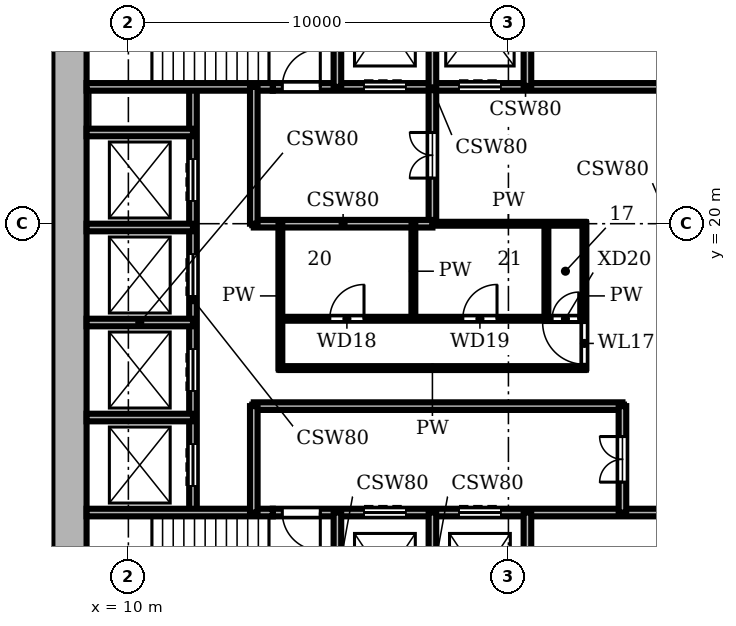
"""IFC4 building model, lengths in metres.
Left out: names, types, materials, properties, quantities, classifications, styles, units other than length and angle.
Written with IfcOpenShell. Run it as: python <this file> out.ifc"""

import sys

from ifc_helpers import new_model, si_unit, direction, frame, frame_2d, origin, place, context, subcontext, project, spatial, rectangle, extrude, element, fill, save


model = new_model("IFC4")
c1 = context("Model", 3, precision=1e-05, world=origin(), true_north=direction((0.0, 1.0)))
c2 = subcontext(c1, "Body", "Model", "MODEL_VIEW")
j1 = project(units=[si_unit("LENGTHUNIT", "METRE"), si_unit("PLANEANGLEUNIT", "RADIAN")], contexts=[c1])
p1 = place(None, origin())
s1 = spatial("IfcSite", under=j1, at=p1, CompositionType="ELEMENT")
p2 = place(p1, origin())
s2 = spatial("IfcBuilding", under=s1, at=p2, CompositionType="ELEMENT")
p3 = place(p2, frame((0.0, 0.0, 58.8)))
s3 = spatial("IfcBuildingStorey", under=s2, at=p3, CompositionType="ELEMENT", Elevation=58.8)
p4 = place(p3, frame((8.45, 27.1, 0.0), z_axis=(0.0, 0.0, 1.0), x_axis=(0.0, -1.0, 0.0)))
e1 = element("IfcWall", 1, at=p4, inside=s3, PredefinedType="SHEAR", context=c2, shape_type="SweptSolid", body=[
    extrude(rectangle(XDim=18.2, YDim=0.9, at=frame_2d((9.1, 0.0))), origin(), (0.0, 0.0, 1.0), 3.9),
])
p5 = place(p3, frame((8.9, 12.4, 0.0), z_axis=(0.0, 0.0, 1.0), x_axis=(1.0, 0.0, 0.0)))
e2 = element("IfcWall", 2, at=p5, inside=s3, PredefinedType="SHEAR", context=c2, shape_type="SweptSolid", body=[
    extrude(rectangle(XDim=4.9, YDim=0.2, at=frame_2d((2.45, 0.0))), origin(), (0.0, 0.0, 1.0), 3.58),
])
p6 = place(p3, frame((13.8, 12.4, 0.0), z_axis=(0.0, 0.0, 1.0), x_axis=(1.0, 0.0, 0.0)))
e3 = element("IfcWall", 3, at=p6, inside=s3, PredefinedType="SHEAR", context=c2, shape_type="SweptSolid", body=[
    extrude(rectangle(XDim=13.3, YDim=0.2, at=frame_2d((6.65, 0.0))), origin(), (0.0, 0.0, 1.0), 3.58),
])
p7 = place(p6, frame((2.4, 0.0, 0.0)))
e4 = element("IfcOpeningElement", 4, at=p7, cuts=e3, PredefinedType="OPENING", context=c2, shape_type="SweptSolid", body=[
    extrude(rectangle(XDim=1.1, YDim=2.1, at=frame_2d((0.55, 1.05))), frame((0.0, 0.11, 0.0), z_axis=(0.0, -1.0, 0.0), x_axis=(1.0, 0.0, 0.0)), (0.0, 0.0, 1.0), 0.22),
])
p8 = place(p6, frame((4.9, 0.0, 0.0)))
e5 = element("IfcOpeningElement", 5, at=p8, cuts=e3, PredefinedType="OPENING", context=c2, shape_type="SweptSolid", body=[
    extrude(rectangle(XDim=1.1, YDim=2.1, at=frame_2d((0.55, 1.05))), frame((0.0, 0.11, 0.0), z_axis=(0.0, -1.0, 0.0), x_axis=(1.0, 0.0, 0.0)), (0.0, 0.0, 1.0), 0.22),
])
p9 = place(p6, frame((0.25, 0.0, 0.0)))
e6 = element("IfcOpeningElement", 6, at=p9, cuts=e3, PredefinedType="OPENING", context=c2, shape_type="SweptSolid", body=[
    extrude(rectangle(XDim=1.0, YDim=2.1, at=frame_2d((0.5, 1.05))), frame((0.0, 0.11, 0.0), z_axis=(0.0, -1.0, 0.0), x_axis=(1.0, 0.0, 0.0)), (0.0, 0.0, 1.0), 0.22),
])
p10 = place(p3, frame((8.9, 14.9, 0.0), z_axis=(0.0, 0.0, 1.0), x_axis=(1.0, 0.0, 0.0)))
e7 = element("IfcWall", 7, at=p10, inside=s3, PredefinedType="SHEAR", context=c2, shape_type="SweptSolid", body=[
    extrude(rectangle(XDim=2.8, YDim=0.2, at=frame_2d((1.4, 0.0))), origin(), (0.0, 0.0, 1.0), 3.58),
])
p11 = place(p3, frame((13.3, 15.2, 0.0), z_axis=(0.0, 0.0, 1.0), x_axis=(1.0, 0.0, 0.0)))
e8 = element("IfcWall", 8, at=p11, inside=s3, PredefinedType="SHEAR", context=c2, shape_type="SweptSolid", body=[
    extrude(rectangle(XDim=9.7, YDim=0.2, at=frame_2d((4.85, 0.0))), origin(), (0.0, 0.0, 1.0), 3.58),
])
p12 = place(p3, frame((14.0, 16.2, 0.0), z_axis=(0.0, 0.0, 1.0), x_axis=(1.0, 0.0, 0.0)))
e9 = element("IfcWall", 9, at=p12, inside=s3, PredefinedType="PARTITIONING", context=c2, shape_type="SweptSolid", body=[
    extrude(rectangle(XDim=8.0, YDim=0.1, at=frame_2d((4.0, 0.0))), origin(), (0.0, 0.0, 1.0), 3.58),
])
p13 = place(p3, frame((8.9, 17.4, 0.0), z_axis=(0.0, 0.0, 1.0), x_axis=(1.0, 0.0, 0.0)))
e10 = element("IfcWall", 10, at=p13, inside=s3, PredefinedType="SHEAR", context=c2, shape_type="SweptSolid", body=[
    extrude(rectangle(XDim=2.8, YDim=0.2, at=frame_2d((1.4, 0.0))), origin(), (0.0, 0.0, 1.0), 3.58),
])
p14 = place(p3, frame((14.0, 17.5, 0.0), z_axis=(0.0, 0.0, 1.0), x_axis=(1.0, 0.0, 0.0)))
e11 = element("IfcWall", 11, at=p14, inside=s3, PredefinedType="PARTITIONING", context=c2, shape_type="SweptSolid", body=[
    extrude(rectangle(XDim=8.0, YDim=0.1, at=frame_2d((4.0, 0.0))), origin(), (0.0, 0.0, 1.0), 3.58),
])
p15 = place(p14, frame((1.3, 0.0, 0.0)))
e12 = element("IfcOpeningElement", 12, at=p15, cuts=e11, PredefinedType="OPENING", context=c2, shape_type="SweptSolid", body=[
    extrude(rectangle(XDim=0.9, YDim=2.1, at=frame_2d((0.45, 1.05))), frame((0.0, 0.06, 0.0), z_axis=(0.0, -1.0, 0.0), x_axis=(1.0, 0.0, 0.0)), (0.0, 0.0, 1.0), 0.12),
])
p16 = place(p14, frame((4.8, 0.0, 0.0)))
e13 = element("IfcOpeningElement", 13, at=p16, cuts=e11, PredefinedType="OPENING", context=c2, shape_type="SweptSolid", body=[
    extrude(rectangle(XDim=0.9, YDim=2.1, at=frame_2d((0.45, 1.05))), frame((0.0, 0.06, 0.0), z_axis=(0.0, -1.0, 0.0), x_axis=(1.0, 0.0, 0.0)), (0.0, 0.0, 1.0), 0.12),
])
p17 = place(p14, frame((7.15, 0.0, 0.0)))
e14 = element("IfcOpeningElement", 14, at=p17, cuts=e11, PredefinedType="OPENING", context=c2, shape_type="SweptSolid", body=[
    extrude(rectangle(XDim=0.7, YDim=2.1, at=frame_2d((0.35, 1.05))), frame((0.0, 0.06, 0.0), z_axis=(0.0, -1.0, 0.0), x_axis=(1.0, 0.0, 0.0)), (0.0, 0.0, 1.0), 0.12),
])
p18 = place(p3, frame((8.9, 19.9, 0.0), z_axis=(0.0, 0.0, 1.0), x_axis=(1.0, 0.0, 0.0)))
e15 = element("IfcWall", 15, at=p18, inside=s3, PredefinedType="SHEAR", context=c2, shape_type="SweptSolid", body=[
    extrude(rectangle(XDim=2.8, YDim=0.2, at=frame_2d((1.4, 0.0))), origin(), (0.0, 0.0, 1.0), 3.58),
])
p19 = place(p3, frame((18.0, 20.0, 0.0), z_axis=(0.0, 0.0, 1.0), x_axis=(1.0, 0.0, 0.0)))
e16 = element("IfcWall", 16, at=p19, inside=s3, PredefinedType="PARTITIONING", context=c2, shape_type="SweptSolid", body=[
    extrude(rectangle(XDim=4.0, YDim=0.1, at=frame_2d((2.0, 0.0))), origin(), (0.0, 0.0, 1.0), 3.58),
])
p20 = place(p3, frame((13.3, 20.0, 0.0), z_axis=(0.0, 0.0, 1.0), x_axis=(1.0, 0.0, 0.0)))
e17 = element("IfcWall", 17, at=p20, inside=s3, PredefinedType="SHEAR", context=c2, shape_type="SweptSolid", body=[
    extrude(rectangle(XDim=4.7, YDim=0.2, at=frame_2d((2.35, 0.0))), origin(), (0.0, 0.0, 1.0), 3.58),
])
p21 = place(p3, frame((8.9, 22.4, 0.0), z_axis=(0.0, 0.0, 1.0), x_axis=(1.0, 0.0, 0.0)))
e18 = element("IfcWall", 18, at=p21, inside=s3, PredefinedType="SHEAR", context=c2, shape_type="SweptSolid", body=[
    extrude(rectangle(XDim=2.8, YDim=0.2, at=frame_2d((1.4, 0.0))), origin(), (0.0, 0.0, 1.0), 3.58),
])
p22 = place(p3, frame((8.9, 23.6, 0.0), z_axis=(0.0, 0.0, 1.0), x_axis=(1.0, 0.0, 0.0)))
e19 = element("IfcWall", 19, at=p22, inside=s3, PredefinedType="SHEAR", context=c2, shape_type="SweptSolid", body=[
    extrude(rectangle(XDim=4.9, YDim=0.2, at=frame_2d((2.45, 0.0))), origin(), (0.0, 0.0, 1.0), 3.58),
])
p23 = place(p3, frame((13.8, 23.6, 0.0), z_axis=(0.0, 0.0, 1.0), x_axis=(1.0, 0.0, 0.0)))
e20 = element("IfcWall", 20, at=p23, inside=s3, PredefinedType="SHEAR", context=c2, shape_type="SweptSolid", body=[
    extrude(rectangle(XDim=13.3, YDim=0.2, at=frame_2d((6.65, 0.0))), origin(), (0.0, 0.0, 1.0), 3.58),
])
p24 = place(p23, frame((2.4, 0.0, 0.0)))
e21 = element("IfcOpeningElement", 21, at=p24, cuts=e20, PredefinedType="OPENING", context=c2, shape_type="SweptSolid", body=[
    extrude(rectangle(XDim=1.1, YDim=2.1, at=frame_2d((0.55, 1.05))), frame((0.0, 0.11, 0.0), z_axis=(0.0, -1.0, 0.0), x_axis=(1.0, 0.0, 0.0)), (0.0, 0.0, 1.0), 0.22),
])
p25 = place(p23, frame((4.9, 0.0, 0.0)))
e22 = element("IfcOpeningElement", 22, at=p25, cuts=e20, PredefinedType="OPENING", context=c2, shape_type="SweptSolid", body=[
    extrude(rectangle(XDim=1.1, YDim=2.1, at=frame_2d((0.55, 1.05))), frame((0.0, 0.11, 0.0), z_axis=(0.0, -1.0, 0.0), x_axis=(1.0, 0.0, 0.0)), (0.0, 0.0, 1.0), 0.22),
])
p26 = place(p23, frame((0.25, 0.0, 0.0)))
e23 = element("IfcOpeningElement", 23, at=p26, cuts=e20, PredefinedType="OPENING", context=c2, shape_type="SweptSolid", body=[
    extrude(rectangle(XDim=1.0, YDim=2.1, at=frame_2d((0.5, 1.05))), frame((0.0, 0.11, 0.0), z_axis=(0.0, -1.0, 0.0), x_axis=(1.0, 0.0, 0.0)), (0.0, 0.0, 1.0), 0.22),
])
p27 = place(p3, frame((11.7, 12.4, 0.0), z_axis=(0.0, 0.0, 1.0), x_axis=(0.0, 1.0, 0.0)))
e24 = element("IfcWall", 24, at=p27, inside=s3, PredefinedType="SHEAR", context=c2, shape_type="SweptSolid", body=[
    extrude(rectangle(XDim=11.2, YDim=0.2, at=frame_2d((5.6, 0.0))), origin(), (0.0, 0.0, 1.0), 3.58),
])
p28 = place(p27, frame((0.7, 0.0, 0.0)))
e25 = element("IfcOpeningElement", 25, at=p28, cuts=e24, PredefinedType="OPENING", context=c2, shape_type="SweptSolid", body=[
    extrude(rectangle(XDim=1.1, YDim=2.1, at=frame_2d((0.55, 1.05))), frame((0.0, 0.11, 0.0), z_axis=(0.0, -1.0, 0.0), x_axis=(1.0, 0.0, 0.0)), (0.0, 0.0, 1.0), 0.22),
])
p29 = place(p27, frame((3.2, 0.0, 0.0)))
e26 = element("IfcOpeningElement", 26, at=p29, cuts=e24, PredefinedType="OPENING", context=c2, shape_type="SweptSolid", body=[
    extrude(rectangle(XDim=1.1, YDim=2.1, at=frame_2d((0.55, 1.05))), frame((0.0, 0.11, 0.0), z_axis=(0.0, -1.0, 0.0), x_axis=(1.0, 0.0, 0.0)), (0.0, 0.0, 1.0), 0.22),
])
p30 = place(p27, frame((5.7, 0.0, 0.0)))
e27 = element("IfcOpeningElement", 27, at=p30, cuts=e24, PredefinedType="OPENING", context=c2, shape_type="SweptSolid", body=[
    extrude(rectangle(XDim=1.1, YDim=2.1, at=frame_2d((0.55, 1.05))), frame((0.0, 0.11, 0.0), z_axis=(0.0, -1.0, 0.0), x_axis=(1.0, 0.0, 0.0)), (0.0, 0.0, 1.0), 0.22),
])
p31 = place(p27, frame((8.2, 0.0, 0.0)))
e28 = element("IfcOpeningElement", 28, at=p31, cuts=e24, PredefinedType="OPENING", context=c2, shape_type="SweptSolid", body=[
    extrude(rectangle(XDim=1.1, YDim=2.1, at=frame_2d((0.55, 1.05))), frame((0.0, 0.11, 0.0), z_axis=(0.0, -1.0, 0.0), x_axis=(1.0, 0.0, 0.0)), (0.0, 0.0, 1.0), 0.22),
])
p32 = place(p3, frame((13.3, 12.4, 0.0), z_axis=(0.0, 0.0, 1.0), x_axis=(0.0, 1.0, 0.0)))
e29 = element("IfcWall", 29, at=p32, inside=s3, PredefinedType="SHEAR", context=c2, shape_type="SweptSolid", body=[
    extrude(rectangle(XDim=2.8, YDim=0.2, at=frame_2d((1.4, 0.0))), origin(), (0.0, 0.0, 1.0), 3.58),
])
p33 = place(p3, frame((13.3, 20.0, 0.0), z_axis=(0.0, 0.0, 1.0), x_axis=(0.0, 1.0, 0.0)))
e30 = element("IfcWall", 30, at=p33, inside=s3, PredefinedType="SHEAR", context=c2, shape_type="SweptSolid", body=[
    extrude(rectangle(XDim=3.6, YDim=0.2, at=frame_2d((1.8, 0.0))), origin(), (0.0, 0.0, 1.0), 3.58),
])
p34 = place(p3, frame((14.0, 16.2, 0.0), z_axis=(0.0, 0.0, 1.0), x_axis=(0.0, 1.0, 0.0)))
e31 = element("IfcWall", 31, at=p34, inside=s3, PredefinedType="PARTITIONING", context=c2, shape_type="SweptSolid", body=[
    extrude(rectangle(XDim=3.8, YDim=0.1, at=frame_2d((1.9, 0.0))), origin(), (0.0, 0.0, 1.0), 3.58),
])
for number, where, z_axis, x_axis in (
    (32, (15.5, 8.9, 0.0), (0.0, 0.0, 1.0), (0.0, 1.0, 0.0)),
    (33, (15.5, 23.6, 0.0), (0.0, 0.0, 1.0), (0.0, 1.0, 0.0)),
):
    element("IfcWall", number, at=place(p3, frame(where, z_axis=z_axis, x_axis=x_axis)), inside=s3, PredefinedType="SHEAR", context=c2, shape_type="SweptSolid", body=[
        extrude(rectangle(XDim=3.5, YDim=0.2, at=frame_2d((1.75, 0.0))), origin(), (0.0, 0.0, 1.0), 3.58),
    ])
p35 = place(p3, frame((17.5, 17.5, 0.0), z_axis=(0.0, 0.0, 1.0), x_axis=(0.0, 1.0, 0.0)))
e34 = element("IfcWall", 34, at=p35, inside=s3, PredefinedType="PARTITIONING", context=c2, shape_type="SweptSolid", body=[
    extrude(rectangle(XDim=2.5, YDim=0.1, at=frame_2d((1.25, 0.0))), origin(), (0.0, 0.0, 1.0), 3.58),
])
p36 = place(p3, frame((18.0, 8.9, 0.0), z_axis=(0.0, 0.0, 1.0), x_axis=(0.0, 1.0, 0.0)))
e35 = element("IfcWall", 35, at=p36, inside=s3, PredefinedType="SHEAR", context=c2, shape_type="SweptSolid", body=[
    extrude(rectangle(XDim=3.5, YDim=0.2, at=frame_2d((1.75, 0.0))), origin(), (0.0, 0.0, 1.0), 3.58),
])
p37 = place(p3, frame((18.0, 20.0, 0.0), z_axis=(0.0, 0.0, 1.0), x_axis=(0.0, 1.0, 0.0)))
e36 = element("IfcWall", 36, at=p37, inside=s3, PredefinedType="SHEAR", context=c2, shape_type="SweptSolid", body=[
    extrude(rectangle(XDim=7.1, YDim=0.2, at=frame_2d((3.55, 0.0))), origin(), (0.0, 0.0, 1.0), 3.58),
])
p38 = place(p37, frame((1.2, 0.0, 0.0)))
e37 = element("IfcOpeningElement", 37, at=p38, cuts=e36, PredefinedType="OPENING", context=c2, shape_type="SweptSolid", body=[
    extrude(rectangle(XDim=1.2, YDim=2.1, at=frame_2d((0.6, 1.05))), frame((0.0, 0.11, 0.0), z_axis=(0.0, -1.0, 0.0), x_axis=(1.0, 0.0, 0.0)), (0.0, 0.0, 1.0), 0.22),
])
for number, where, z_axis, x_axis in (
    (38, (20.5, 8.9, 0.0), (0.0, 0.0, 1.0), (0.0, 1.0, 0.0)),
    (39, (20.5, 23.6, 0.0), (0.0, 0.0, 1.0), (0.0, 1.0, 0.0)),
):
    element("IfcWall", number, at=place(p3, frame(where, z_axis=z_axis, x_axis=x_axis)), inside=s3, PredefinedType="SHEAR", context=c2, shape_type="SweptSolid", body=[
        extrude(rectangle(XDim=3.5, YDim=0.2, at=frame_2d((1.75, 0.0))), origin(), (0.0, 0.0, 1.0), 3.58),
    ])
p39 = place(p3, frame((21.0, 17.5, 0.0), z_axis=(0.0, 0.0, 1.0), x_axis=(0.0, 1.0, 0.0)))
e40 = element("IfcWall", 40, at=p39, inside=s3, PredefinedType="PARTITIONING", context=c2, shape_type="SweptSolid", body=[
    extrude(rectangle(XDim=2.5, YDim=0.1, at=frame_2d((1.25, 0.0))), origin(), (0.0, 0.0, 1.0), 3.58),
])
p40 = place(p3, frame((22.0, 16.2, 0.0), z_axis=(0.0, 0.0, 1.0), x_axis=(0.0, 1.0, 0.0)))
e41 = element("IfcWall", 41, at=p40, inside=s3, PredefinedType="PARTITIONING", context=c2, shape_type="SweptSolid", body=[
    extrude(rectangle(XDim=3.8, YDim=0.1, at=frame_2d((1.9, 0.0))), origin(), (0.0, 0.0, 1.0), 3.58),
])
p41 = place(p40, frame((0.1, 0.0, 0.0)))
e42 = element("IfcOpeningElement", 42, at=p41, cuts=e41, PredefinedType="OPENING", context=c2, shape_type="SweptSolid", body=[
    extrude(rectangle(XDim=1.1, YDim=2.1, at=frame_2d((0.55, 1.05))), frame((0.0, 0.06, 0.0), z_axis=(0.0, -1.0, 0.0), x_axis=(1.0, 0.0, 0.0)), (0.0, 0.0, 1.0), 0.12),
])
p42 = place(p3, frame((23.0, 12.4, 0.0), z_axis=(0.0, 0.0, 1.0), x_axis=(0.0, 1.0, 0.0)))
e43 = element("IfcWall", 43, at=p42, inside=s3, PredefinedType="SHEAR", context=c2, shape_type="SweptSolid", body=[
    extrude(rectangle(XDim=2.8, YDim=0.2, at=frame_2d((1.4, 0.0))), origin(), (0.0, 0.0, 1.0), 3.58),
])
p43 = place(p42, frame((0.8, 0.0, 0.0)))
e44 = element("IfcOpeningElement", 44, at=p43, cuts=e43, PredefinedType="OPENING", context=c2, shape_type="SweptSolid", body=[
    extrude(rectangle(XDim=1.2, YDim=2.1, at=frame_2d((0.6, 1.05))), frame((0.0, 0.11, 0.0), z_axis=(0.0, -1.0, 0.0), x_axis=(1.0, 0.0, 0.0)), (0.0, 0.0, 1.0), 0.22),
])
p44 = place(p28, origin())
e45 = element("IfcDoor", 45, at=p44, inside=s3, OperationType="DOUBLE_DOOR_SLIDING", PredefinedType="DOOR", context=c2, shape_type="SweptSolid", body=[
    extrude(rectangle(XDim=1.1, YDim=2.1, at=frame_2d((0.55, 1.05))), frame((0.0, 0.025, 0.0), z_axis=(0.0, -1.0, 0.0), x_axis=(1.0, 0.0, 0.0)), (0.0, 0.0, 1.0), 0.05),
])
fill(e25, e45)
p45 = place(p29, origin())
e46 = element("IfcDoor", 46, at=p45, inside=s3, OperationType="DOUBLE_DOOR_SLIDING", PredefinedType="DOOR", context=c2, shape_type="SweptSolid", body=[
    extrude(rectangle(XDim=1.1, YDim=2.1, at=frame_2d((0.55, 1.05))), frame((0.0, 0.025, 0.0), z_axis=(0.0, -1.0, 0.0), x_axis=(1.0, 0.0, 0.0)), (0.0, 0.0, 1.0), 0.05),
])
fill(e26, e46)
p46 = place(p30, origin())
e47 = element("IfcDoor", 47, at=p46, inside=s3, OperationType="DOUBLE_DOOR_SLIDING", PredefinedType="DOOR", context=c2, shape_type="SweptSolid", body=[
    extrude(rectangle(XDim=1.1, YDim=2.1, at=frame_2d((0.55, 1.05))), frame((0.0, 0.025, 0.0), z_axis=(0.0, -1.0, 0.0), x_axis=(1.0, 0.0, 0.0)), (0.0, 0.0, 1.0), 0.05),
])
fill(e27, e47)
p47 = place(p31, origin())
e48 = element("IfcDoor", 48, at=p47, inside=s3, OperationType="DOUBLE_DOOR_SLIDING", PredefinedType="DOOR", context=c2, shape_type="SweptSolid", body=[
    extrude(rectangle(XDim=1.1, YDim=2.1, at=frame_2d((0.55, 1.05))), frame((0.0, 0.025, 0.0), z_axis=(0.0, -1.0, 0.0), x_axis=(1.0, 0.0, 0.0)), (0.0, 0.0, 1.0), 0.05),
])
fill(e28, e48)
p48 = place(p7, origin())
e49 = element("IfcDoor", 49, at=p48, inside=s3, OperationType="DOUBLE_DOOR_SLIDING", PredefinedType="DOOR", context=c2, shape_type="SweptSolid", body=[
    extrude(rectangle(XDim=1.1, YDim=2.1, at=frame_2d((0.55, 1.05))), frame((0.0, 0.025, 0.0), z_axis=(0.0, -1.0, 0.0), x_axis=(1.0, 0.0, 0.0)), (0.0, 0.0, 1.0), 0.05),
])
fill(e4, e49)
p49 = place(p8, origin())
e50 = element("IfcDoor", 50, at=p49, inside=s3, OperationType="DOUBLE_DOOR_SLIDING", PredefinedType="DOOR", context=c2, shape_type="SweptSolid", body=[
    extrude(rectangle(XDim=1.1, YDim=2.1, at=frame_2d((0.55, 1.05))), frame((0.0, 0.025, 0.0), z_axis=(0.0, -1.0, 0.0), x_axis=(1.0, 0.0, 0.0)), (0.0, 0.0, 1.0), 0.05),
])
fill(e5, e50)
p50 = place(p24, origin())
e51 = element("IfcDoor", 51, at=p50, inside=s3, OperationType="DOUBLE_DOOR_SLIDING", PredefinedType="DOOR", context=c2, shape_type="SweptSolid", body=[
    extrude(rectangle(XDim=1.1, YDim=2.1, at=frame_2d((0.55, 1.05))), frame((0.0, 0.025, 0.0), z_axis=(0.0, -1.0, 0.0), x_axis=(1.0, 0.0, 0.0)), (0.0, 0.0, 1.0), 0.05),
])
fill(e21, e51)
p51 = place(p25, origin())
e52 = element("IfcDoor", 52, at=p51, inside=s3, OperationType="DOUBLE_DOOR_SLIDING", PredefinedType="DOOR", context=c2, shape_type="SweptSolid", body=[
    extrude(rectangle(XDim=1.1, YDim=2.1, at=frame_2d((0.55, 1.05))), frame((0.0, 0.025, 0.0), z_axis=(0.0, -1.0, 0.0), x_axis=(1.0, 0.0, 0.0)), (0.0, 0.0, 1.0), 0.05),
])
fill(e22, e52)
p52 = place(p9, frame((1.0, 0.0, 0.0), z_axis=(0.0, 0.0, 1.0), x_axis=(-1.0, 0.0, 0.0)))
e53 = element("IfcDoor", 53, at=p52, inside=s3, OperationType="SINGLE_SWING_LEFT", PredefinedType="DOOR", context=c2, shape_type="SweptSolid", body=[
    extrude(rectangle(XDim=1.0, YDim=2.1, at=frame_2d((0.5, 1.05))), frame((0.0, 0.025, 0.0), z_axis=(0.0, -1.0, 0.0), x_axis=(1.0, 0.0, 0.0)), (0.0, 0.0, 1.0), 0.05),
])
fill(e6, e53)
p53 = place(p26, origin())
e54 = element("IfcDoor", 54, at=p53, inside=s3, OperationType="SINGLE_SWING_RIGHT", PredefinedType="DOOR", context=c2, shape_type="SweptSolid", body=[
    extrude(rectangle(XDim=1.0, YDim=2.1, at=frame_2d((0.5, 1.05))), frame((0.0, 0.025, 0.0), z_axis=(0.0, -1.0, 0.0), x_axis=(1.0, 0.0, 0.0)), (0.0, 0.0, 1.0), 0.05),
])
fill(e23, e54)
p54 = place(p43, origin())
e55 = element("IfcDoor", 55, at=p54, inside=s3, OperationType="DOUBLE_DOOR_SINGLE_SWING", PredefinedType="DOOR", context=c2, shape_type="SweptSolid", body=[
    extrude(rectangle(XDim=1.2, YDim=2.1, at=frame_2d((0.6, 1.05))), frame((0.0, 0.025, 0.0), z_axis=(0.0, -1.0, 0.0), x_axis=(1.0, 0.0, 0.0)), (0.0, 0.0, 1.0), 0.05),
])
fill(e44, e55)
p55 = place(p38, origin())
e56 = element("IfcDoor", 56, at=p55, inside=s3, OperationType="DOUBLE_DOOR_SINGLE_SWING", PredefinedType="DOOR", context=c2, shape_type="SweptSolid", body=[
    extrude(rectangle(XDim=1.2, YDim=2.1, at=frame_2d((0.6, 1.05))), frame((0.0, 0.025, 0.0), z_axis=(0.0, -1.0, 0.0), x_axis=(1.0, 0.0, 0.0)), (0.0, 0.0, 1.0), 0.05),
])
fill(e37, e56)
p56 = place(p41, origin())
e57 = element("IfcDoor", 57, at=p56, inside=s3, OperationType="SINGLE_SWING_RIGHT", PredefinedType="DOOR", context=c2, shape_type="SweptSolid", body=[
    extrude(rectangle(XDim=1.1, YDim=2.1, at=frame_2d((0.55, 1.05))), frame((0.0, 0.025, 0.0), z_axis=(0.0, -1.0, 0.0), x_axis=(1.0, 0.0, 0.0)), (0.0, 0.0, 1.0), 0.05),
])
fill(e42, e57)
p57 = place(p15, origin())
e58 = element("IfcDoor", 58, at=p57, inside=s3, OperationType="SINGLE_SWING_RIGHT", PredefinedType="DOOR", context=c2, shape_type="SweptSolid", body=[
    extrude(rectangle(XDim=0.9, YDim=2.1, at=frame_2d((0.45, 1.05))), frame((0.0, 0.025, 0.0), z_axis=(0.0, -1.0, 0.0), x_axis=(1.0, 0.0, 0.0)), (0.0, 0.0, 1.0), 0.05),
])
fill(e12, e58)
p58 = place(p16, origin())
e59 = element("IfcDoor", 59, at=p58, inside=s3, OperationType="SINGLE_SWING_RIGHT", PredefinedType="DOOR", context=c2, shape_type="SweptSolid", body=[
    extrude(rectangle(XDim=0.9, YDim=2.1, at=frame_2d((0.45, 1.05))), frame((0.0, 0.025, 0.0), z_axis=(0.0, -1.0, 0.0), x_axis=(1.0, 0.0, 0.0)), (0.0, 0.0, 1.0), 0.05),
])
fill(e13, e59)
p59 = place(p17, origin())
e60 = element("IfcDoor", 60, at=p59, inside=s3, OperationType="SINGLE_SWING_RIGHT", PredefinedType="DOOR", context=c2, shape_type="SweptSolid", body=[
    extrude(rectangle(XDim=0.7, YDim=2.1, at=frame_2d((0.35, 1.05))), frame((0.0, 0.025, 0.0), z_axis=(0.0, -1.0, 0.0), x_axis=(1.0, 0.0, 0.0)), (0.0, 0.0, 1.0), 0.05),
])
fill(e14, e60)
save(model, sys.argv[1])
